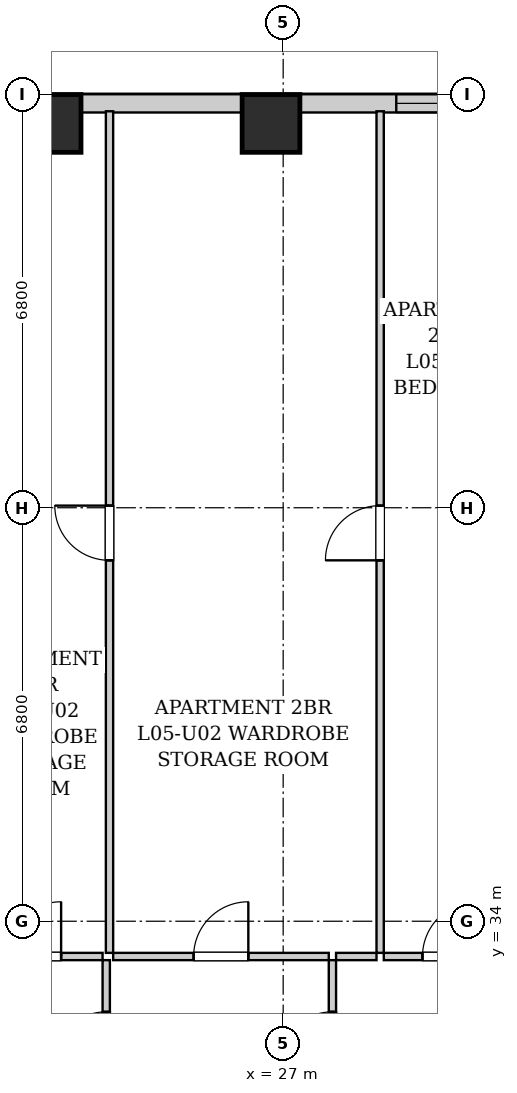
"""IFC4 building model, lengths in metres.
Left out: names, types, materials, properties, quantities, classifications, styles, units other than length and angle.
Written with IfcOpenShell. Run it as: python <this file> out.ifc"""

import sys

from ifc_helpers import new_model, si_unit, direction, frame, frame_2d, origin, origin_2d, place, context, subcontext, project, spatial, rectangle, extrude, element, fill, save


model = new_model("IFC4")
c1 = context("Model", 3, precision=1e-05, world=origin(), true_north=direction((0.0, 1.0)))
c2 = subcontext(c1, "Body", "Model", "MODEL_VIEW")
j1 = project(units=[si_unit("LENGTHUNIT", "METRE"), si_unit("PLANEANGLEUNIT", "RADIAN")], contexts=[c1])
p1 = place(None, origin())
s1 = spatial("IfcSite", under=j1, at=p1, CompositionType="ELEMENT")
p2 = place(p1, origin())
s2 = spatial("IfcBuilding", under=s1, at=p2, CompositionType="ELEMENT")
p3 = place(p2, frame((0.0, 0.0, 25.8)))
s3 = spatial("IfcBuildingStorey", under=s2, at=p3, CompositionType="ELEMENT", Elevation=25.8)
for number, where, z_axis, x_axis in (
    (1, (23.2, 47.12, 0.0), (0.0, 0.0, 1.0), (1.0, 0.0, 0.0)),
    (2, (26.8, 47.12, 0.0), (0.0, 0.0, 1.0), (1.0, 0.0, 0.0)),
):
    element("IfcColumn", number, at=place(p3, frame(where, z_axis=z_axis, x_axis=x_axis)), inside=s3, PredefinedType="COLUMN", context=c2, shape_type="SweptSolid", body=[
        extrude(rectangle(XDim=0.95, YDim=0.95, at=origin_2d()), origin(), (0.0, 0.0, 1.0), 3.2),
    ])
p4 = place(p3, frame((10.0, 47.45, 0.0), z_axis=(0.0, 0.0, 1.0), x_axis=(1.0, 0.0, 0.0)))
e3 = element("IfcWall", 3, at=p4, inside=s3, PredefinedType="SOLIDWALL", context=c2, shape_type="SweptSolid", body=[
    extrude(rectangle(XDim=28.1, YDim=0.3, at=frame_2d((14.05, 0.0))), origin(), (0.0, 0.0, 1.0), 1.975),
])
p5 = place(p4, frame((5.712, 0.0, 0.55)))
e4 = element("IfcOpeningElement", 4, at=p5, cuts=e3, PredefinedType="OPENING", context=c2, shape_type="SweptSolid", body=[
    extrude(rectangle(XDim=1.35, YDim=1.2, at=frame_2d((0.675, 0.6))), frame((0.0, 0.16, 0.0), z_axis=(0.0, -1.0, 0.0), x_axis=(1.0, 0.0, 0.0)), (0.0, 0.0, 1.0), 0.32),
])
p6 = place(p4, frame((8.792, 0.0, 0.55)))
e5 = element("IfcOpeningElement", 5, at=p6, cuts=e3, PredefinedType="OPENING", context=c2, shape_type="SweptSolid", body=[
    extrude(rectangle(XDim=1.8, YDim=1.2, at=frame_2d((0.9, 0.6))), frame((0.0, 0.16, 0.0), z_axis=(0.0, -1.0, 0.0), x_axis=(1.0, 0.0, 0.0)), (0.0, 0.0, 1.0), 0.32),
])
p7 = place(p4, frame((18.86, 0.0, 0.55)))
e6 = element("IfcOpeningElement", 6, at=p7, cuts=e3, PredefinedType="OPENING", context=c2, shape_type="SweptSolid", body=[
    extrude(rectangle(XDim=1.8, YDim=1.2, at=frame_2d((0.9, 0.6))), frame((0.0, 0.16, 0.0), z_axis=(0.0, -1.0, 0.0), x_axis=(1.0, 0.0, 0.0)), (0.0, 0.0, 1.0), 0.32),
])
p8 = place(p4, frame((21.215, 0.0, 0.55)))
e7 = element("IfcOpeningElement", 7, at=p8, cuts=e3, PredefinedType="OPENING", context=c2, shape_type="SweptSolid", body=[
    extrude(rectangle(XDim=1.35, YDim=1.2, at=frame_2d((0.675, 0.6))), frame((0.0, 0.16, 0.0), z_axis=(0.0, -1.0, 0.0), x_axis=(1.0, 0.0, 0.0)), (0.0, 0.0, 1.0), 0.32),
])
p9 = place(p4, frame((23.969, 0.0, 0.55)))
e8 = element("IfcOpeningElement", 8, at=p9, cuts=e3, PredefinedType="OPENING", context=c2, shape_type="SweptSolid", body=[
    extrude(rectangle(XDim=1.8, YDim=1.2, at=frame_2d((0.9, 0.6))), frame((0.0, 0.16, 0.0), z_axis=(0.0, -1.0, 0.0), x_axis=(1.0, 0.0, 0.0)), (0.0, 0.0, 1.0), 0.32),
])
p10 = place(p4, frame((26.698, 0.0, 0.55)))
e9 = element("IfcOpeningElement", 9, at=p10, cuts=e3, PredefinedType="OPENING", context=c2, shape_type="SweptSolid", body=[
    extrude(rectangle(XDim=0.85, YDim=1.2, at=frame_2d((0.425, 0.6))), frame((0.0, 0.16, 0.0), z_axis=(0.0, -1.0, 0.0), x_axis=(1.0, 0.0, 0.0)), (0.0, 0.0, 1.0), 0.32),
])
p11 = place(p3, frame((24.09, 30.76, 0.0), z_axis=(0.0, 0.0, 1.0), x_axis=(0.0, 1.0, 0.0)))
e10 = element("IfcWall", 10, at=p11, inside=s3, PredefinedType="PARTITIONING", context=c2, shape_type="SweptSolid", body=[
    extrude(rectangle(XDim=2.6, YDim=0.12, at=frame_2d((1.3, 0.0))), origin(), (0.0, 0.0, 1.0), 2.94),
])
p12 = place(p11, frame((0.85, 0.0, 0.0)))
e11 = element("IfcOpeningElement", 11, at=p12, cuts=e10, PredefinedType="OPENING", context=c2, shape_type="SweptSolid", body=[
    extrude(rectangle(XDim=0.9, YDim=2.05, at=frame_2d((0.45, 1.025))), frame((0.0, 0.07, 0.0), z_axis=(0.0, -1.0, 0.0), x_axis=(1.0, 0.0, 0.0)), (0.0, 0.0, 1.0), 0.14),
])
p13 = place(p3, frame((21.767, 33.42, 0.0), z_axis=(0.0, 0.0, 1.0), x_axis=(1.0, 0.0, 0.0)))
e12 = element("IfcWall", 12, at=p13, inside=s3, PredefinedType="PARTITIONING", context=c2, shape_type="SweptSolid", body=[
    extrude(rectangle(XDim=2.263, YDim=0.12, at=frame_2d((1.131, 0.0))), origin(), (0.0, 0.0, 1.0), 2.94),
])
p14 = place(p13, frame((0.681, 0.0, 0.0)))
e13 = element("IfcOpeningElement", 13, at=p14, cuts=e12, PredefinedType="OPENING", context=c2, shape_type="SweptSolid", body=[
    extrude(rectangle(XDim=0.9, YDim=2.05, at=frame_2d((0.45, 1.025))), frame((0.0, 0.07, 0.0), z_axis=(0.0, -1.0, 0.0), x_axis=(1.0, 0.0, 0.0)), (0.0, 0.0, 1.0), 0.14),
])
p15 = place(p3, frame((27.81, 30.76, 0.0), z_axis=(0.0, 0.0, 1.0), x_axis=(0.0, 1.0, 0.0)))
e14 = element("IfcWall", 14, at=p15, inside=s3, PredefinedType="PARTITIONING", context=c2, shape_type="SweptSolid", body=[
    extrude(rectangle(XDim=2.6, YDim=0.12, at=frame_2d((1.3, 0.0))), origin(), (0.0, 0.0, 1.0), 2.94),
])
p16 = place(p15, frame((0.85, 0.0, 0.0)))
e15 = element("IfcOpeningElement", 15, at=p16, cuts=e14, PredefinedType="OPENING", context=c2, shape_type="SweptSolid", body=[
    extrude(rectangle(XDim=0.9, YDim=2.05, at=frame_2d((0.45, 1.025))), frame((0.0, 0.07, 0.0), z_axis=(0.0, -1.0, 0.0), x_axis=(1.0, 0.0, 0.0)), (0.0, 0.0, 1.0), 0.14),
])
p17 = place(p3, frame((24.204, 33.42, 0.0), z_axis=(0.0, 0.0, 1.0), x_axis=(1.0, 0.0, 0.0)))
e16 = element("IfcWall", 16, at=p17, inside=s3, PredefinedType="PARTITIONING", context=c2, shape_type="SweptSolid", body=[
    extrude(rectangle(XDim=3.546, YDim=0.12, at=frame_2d((1.773, 0.0))), origin(), (0.0, 0.0, 1.0), 2.94),
])
p18 = place(p17, frame((1.323, 0.0, 0.0)))
e17 = element("IfcOpeningElement", 17, at=p18, cuts=e16, PredefinedType="OPENING", context=c2, shape_type="SweptSolid", body=[
    extrude(rectangle(XDim=0.9, YDim=2.05, at=frame_2d((0.45, 1.025))), frame((0.0, 0.07, 0.0), z_axis=(0.0, -1.0, 0.0), x_axis=(1.0, 0.0, 0.0)), (0.0, 0.0, 1.0), 0.14),
])
p19 = place(p3, frame((27.87, 33.42, 0.0), z_axis=(0.0, 0.0, 1.0), x_axis=(1.0, 0.0, 0.0)))
e18 = element("IfcWall", 18, at=p19, inside=s3, PredefinedType="PARTITIONING", context=c2, shape_type="SweptSolid", body=[
    extrude(rectangle(XDim=0.665, YDim=0.12, at=frame_2d((0.333, 0.0))), origin(), (0.0, 0.0, 1.0), 2.94),
])
p20 = place(p3, frame((28.655, 33.42, 0.0), z_axis=(0.0, 0.0, 1.0), x_axis=(1.0, 0.0, 0.0)))
e19 = element("IfcWall", 19, at=p20, inside=s3, PredefinedType="PARTITIONING", context=c2, shape_type="SweptSolid", body=[
    extrude(rectangle(XDim=2.173, YDim=0.12, at=frame_2d((1.086, 0.0))), origin(), (0.0, 0.0, 1.0), 2.94),
])
p21 = place(p20, frame((0.636, 0.0, 0.0)))
e20 = element("IfcOpeningElement", 20, at=p21, cuts=e19, PredefinedType="OPENING", context=c2, shape_type="SweptSolid", body=[
    extrude(rectangle(XDim=0.9, YDim=2.05, at=frame_2d((0.45, 1.025))), frame((0.0, 0.07, 0.0), z_axis=(0.0, -1.0, 0.0), x_axis=(1.0, 0.0, 0.0)), (0.0, 0.0, 1.0), 0.14),
])
p22 = place(p3, frame((24.144, 33.48, 0.0), z_axis=(0.0, 0.0, 1.0), x_axis=(0.0, 1.0, 0.0)))
e21 = element("IfcWall", 21, at=p22, inside=s3, PredefinedType="PARTITIONING", context=c2, shape_type="SweptSolid", body=[
    extrude(rectangle(XDim=13.84, YDim=0.12, at=frame_2d((6.92, 0.0))), origin(), (0.0, 0.0, 1.0), 2.94),
])
p23 = place(p22, frame((6.455, 0.0, 0.0)))
e22 = element("IfcOpeningElement", 22, at=p23, cuts=e21, PredefinedType="OPENING", context=c2, shape_type="SweptSolid", body=[
    extrude(rectangle(XDim=0.9, YDim=2.05, at=frame_2d((0.45, 1.025))), frame((0.0, 0.07, 0.0), z_axis=(0.0, -1.0, 0.0), x_axis=(1.0, 0.0, 0.0)), (0.0, 0.0, 1.0), 0.14),
])
p24 = place(p3, frame((28.595, 33.48, 0.0), z_axis=(0.0, 0.0, 1.0), x_axis=(0.0, 1.0, 0.0)))
e23 = element("IfcWall", 23, at=p24, inside=s3, PredefinedType="PARTITIONING", context=c2, shape_type="SweptSolid", body=[
    extrude(rectangle(XDim=13.84, YDim=0.12, at=frame_2d((6.92, 0.0))), origin(), (0.0, 0.0, 1.0), 2.94),
])
p25 = place(p24, frame((6.455, 0.0, 0.0)))
e24 = element("IfcOpeningElement", 24, at=p25, cuts=e23, PredefinedType="OPENING", context=c2, shape_type="SweptSolid", body=[
    extrude(rectangle(XDim=0.9, YDim=2.05, at=frame_2d((0.45, 1.025))), frame((0.0, 0.07, 0.0), z_axis=(0.0, -1.0, 0.0), x_axis=(1.0, 0.0, 0.0)), (0.0, 0.0, 1.0), 0.14),
])
p26 = place(p12, origin())
e25 = element("IfcDoor", 25, at=p26, inside=s3, OperationType="SINGLE_SWING_LEFT", PredefinedType="DOOR", context=c2, shape_type="SweptSolid", body=[
    extrude(rectangle(XDim=0.9, YDim=2.05, at=frame_2d((0.45, 1.025))), frame((0.0, 0.025, 0.0), z_axis=(0.0, -1.0, 0.0), x_axis=(1.0, 0.0, 0.0)), (0.0, 0.0, 1.0), 0.05),
])
fill(e11, e25)
p27 = place(p14, origin())
e26 = element("IfcDoor", 26, at=p27, inside=s3, OperationType="SINGLE_SWING_RIGHT", PredefinedType="DOOR", context=c2, shape_type="SweptSolid", body=[
    extrude(rectangle(XDim=0.9, YDim=2.05, at=frame_2d((0.45, 1.025))), frame((0.0, 0.025, 0.0), z_axis=(0.0, -1.0, 0.0), x_axis=(1.0, 0.0, 0.0)), (0.0, 0.0, 1.0), 0.05),
])
fill(e13, e26)
p28 = place(p16, origin())
e27 = element("IfcDoor", 27, at=p28, inside=s3, OperationType="SINGLE_SWING_LEFT", PredefinedType="DOOR", context=c2, shape_type="SweptSolid", body=[
    extrude(rectangle(XDim=0.9, YDim=2.05, at=frame_2d((0.45, 1.025))), frame((0.0, 0.025, 0.0), z_axis=(0.0, -1.0, 0.0), x_axis=(1.0, 0.0, 0.0)), (0.0, 0.0, 1.0), 0.05),
])
fill(e15, e27)
p29 = place(p18, origin())
e28 = element("IfcDoor", 28, at=p29, inside=s3, OperationType="SINGLE_SWING_RIGHT", PredefinedType="DOOR", context=c2, shape_type="SweptSolid", body=[
    extrude(rectangle(XDim=0.9, YDim=2.05, at=frame_2d((0.45, 1.025))), frame((0.0, 0.025, 0.0), z_axis=(0.0, -1.0, 0.0), x_axis=(1.0, 0.0, 0.0)), (0.0, 0.0, 1.0), 0.05),
])
fill(e17, e28)
p30 = place(p21, origin())
e29 = element("IfcDoor", 29, at=p30, inside=s3, OperationType="SINGLE_SWING_RIGHT", PredefinedType="DOOR", context=c2, shape_type="SweptSolid", body=[
    extrude(rectangle(XDim=0.9, YDim=2.05, at=frame_2d((0.45, 1.025))), frame((0.0, 0.025, 0.0), z_axis=(0.0, -1.0, 0.0), x_axis=(1.0, 0.0, 0.0)), (0.0, 0.0, 1.0), 0.05),
])
fill(e20, e29)
p31 = place(p23, origin())
e30 = element("IfcDoor", 30, at=p31, inside=s3, OperationType="SINGLE_SWING_RIGHT", PredefinedType="DOOR", context=c2, shape_type="SweptSolid", body=[
    extrude(rectangle(XDim=0.9, YDim=2.05, at=frame_2d((0.45, 1.025))), frame((0.0, 0.025, 0.0), z_axis=(0.0, -1.0, 0.0), x_axis=(1.0, 0.0, 0.0)), (0.0, 0.0, 1.0), 0.05),
])
fill(e22, e30)
p32 = place(p25, origin())
e31 = element("IfcDoor", 31, at=p32, inside=s3, OperationType="SINGLE_SWING_LEFT", PredefinedType="DOOR", context=c2, shape_type="SweptSolid", body=[
    extrude(rectangle(XDim=0.9, YDim=2.05, at=frame_2d((0.45, 1.025))), frame((0.0, 0.025, 0.0), z_axis=(0.0, -1.0, 0.0), x_axis=(1.0, 0.0, 0.0)), (0.0, 0.0, 1.0), 0.05),
])
fill(e24, e31)
p33 = place(p7, origin())
e32 = element("IfcWindow", 32, at=p33, inside=s3, PartitioningType="DOUBLE_PANEL_VERTICAL", PredefinedType="WINDOW", context=c2, shape_type="SweptSolid", body=[
    extrude(rectangle(XDim=1.8, YDim=1.2, at=frame_2d((0.9, 0.6))), frame((0.0, 0.03, 0.0), z_axis=(0.0, -1.0, 0.0), x_axis=(1.0, 0.0, 0.0)), (0.0, 0.0, 1.0), 0.06),
])
fill(e6, e32)
save(model, sys.argv[1])
